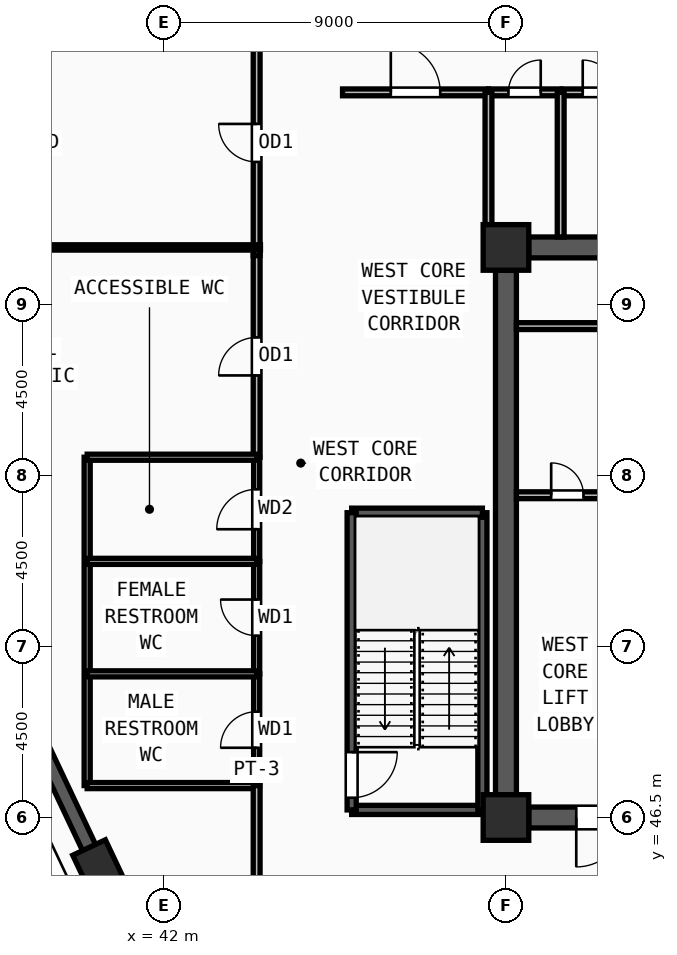
"""IFC4 building model, lengths in metres.
Left out: names, types, materials, properties, quantities, classifications, styles, units other than length and angle.
Written with IfcOpenShell. Run it as: python <this file> out.ifc"""

import sys

from ifc_helpers import new_model, si_unit, direction, frame, frame_2d, origin, origin_2d, place, context, subcontext, project, spatial, rectangle, extrude, source, transform, mapped, element, fill, save


model = new_model("IFC4")
c1 = context("Model", 3, precision=1e-05, world=origin(), true_north=direction((0.0, 1.0)))
c2 = subcontext(c1, "Body", "Model", "MODEL_VIEW")
j1 = project(units=[si_unit("LENGTHUNIT", "METRE"), si_unit("PLANEANGLEUNIT", "RADIAN")], contexts=[c1])
p1 = place(None, origin())
s1 = spatial("IfcSite", under=j1, at=p1, CompositionType="ELEMENT")
p2 = place(p1, origin())
s2 = spatial("IfcBuilding", under=s1, at=p2, CompositionType="ELEMENT")
p3 = place(p2, frame((0.0, 0.0, 328.5)))
s3 = spatial("IfcBuildingStorey", under=s2, at=p3, CompositionType="ELEMENT", Elevation=328.5)
m1 = source(origin(), c2, "Body", "SweptSolid", [
    extrude(rectangle(XDim=1.2, YDim=1.2, at=origin_2d()), origin(), (0.0, 0.0, 1.0), 3.75),
])
for number, where, z_axis, x_axis in (
    (1, (51.0, 46.5, 0.0), (0.0, 0.0, 1.0), (1.0, 0.0, 0.0)),
    (2, (51.0, 61.5, 0.0), (0.0, 0.0, 1.0), (1.0, 0.0, 0.0)),
):
    element("IfcColumn", number, at=place(p3, frame(where, z_axis=z_axis, x_axis=x_axis)), inside=s3, PredefinedType="COLUMN", context=c2, shape_type="MappedRepresentation", body=[
        mapped(m1, transform((0.0, 0.0, 0.0), x_axis=(1.0, 0.0, 0.0), y_axis=(0.0, 1.0, 0.0), z_axis=(0.0, 0.0, 1.0), scale=1.0)),
    ])
m2 = source(origin(), c2, "Body", "SweptSolid", [
    extrude(rectangle(XDim=1.1, YDim=0.95, at=origin_2d()), origin(), (0.0, 0.0, 1.0), 3.75),
])
p4 = place(p3, frame((40.265, 45.213, 0.0), z_axis=(0.0, 0.0, 1.0), x_axis=(-0.427357863387, 0.904082549661, 0.0)))
e3 = element("IfcColumn", 3, at=p4, inside=s3, PredefinedType="COLUMN", context=c2, shape_type="MappedRepresentation", body=[
    mapped(m2, transform((0.0, 0.0, 0.0), x_axis=(1.0, 0.0, 0.0), y_axis=(0.0, 1.0, 0.0), z_axis=(0.0, 0.0, 1.0), scale=1.0)),
])
p5 = place(p3, frame((30.958, 64.905, 0.0), z_axis=(0.0, 0.0, 1.0), x_axis=(0.427288231304, -0.904115461315, 0.0)))
e4 = element("IfcWall", 4, at=p5, inside=s3, PredefinedType="SOLIDWALL", context=c2, shape_type="SweptSolid", body=[
    extrude(rectangle(XDim=21.241, YDim=0.38, at=frame_2d((10.62, 0.0))), origin(), (0.0, 0.0, 1.0), 3.57),
])
m3 = source(origin(), c2, "Body", "SweptSolid", [
    extrude(rectangle(XDim=1.35, YDim=1.85, at=frame_2d((0.675, 0.925))), frame((0.0, 0.2, 0.0), z_axis=(0.0, -1.0, 0.0), x_axis=(1.0, 0.0, 0.0)), (0.0, 0.0, 1.0), 0.4),
])
p6 = place(p5, frame((4.635, 0.0, 0.55)))
e5 = element("IfcOpeningElement", 5, at=p6, cuts=e4, PredefinedType="OPENING", context=c2, shape_type="MappedRepresentation", body=[
    mapped(m3, transform((0.0, 0.0, 0.0), x_axis=(1.0, 0.0, 0.0), y_axis=(0.0, 1.0, 0.0), z_axis=(0.0, 0.0, 1.0), scale=1.0)),
])
p7 = place(p5, frame((9.945, 0.0, 0.55)))
e6 = element("IfcOpeningElement", 6, at=p7, cuts=e4, PredefinedType="OPENING", context=c2, shape_type="MappedRepresentation", body=[
    mapped(m3, transform((0.0, 0.0, 0.0), x_axis=(1.0, 0.0, 0.0), y_axis=(0.0, 1.0, 0.0), z_axis=(0.0, 0.0, 1.0), scale=1.0)),
])
p8 = place(p5, frame((15.256, 0.0, 0.55)))
e7 = element("IfcOpeningElement", 7, at=p8, cuts=e4, PredefinedType="OPENING", context=c2, shape_type="MappedRepresentation", body=[
    mapped(m3, transform((0.0, 0.0, 0.0), x_axis=(1.0, 0.0, 0.0), y_axis=(0.0, 1.0, 0.0), z_axis=(0.0, 0.0, 1.0), scale=1.0)),
])
p9 = place(p3, frame((51.6, 61.5, 0.0), z_axis=(0.0, 0.0, 1.0), x_axis=(1.0, 0.0, 0.0)))
e8 = element("IfcWall", 8, at=p9, inside=s3, PredefinedType="SHEAR", context=c2, shape_type="SweptSolid", body=[
    extrude(rectangle(XDim=7.8, YDim=0.55, at=frame_2d((3.9, 0.0))), origin(), (0.0, 0.0, 1.0), 3.57),
])
p10 = place(p3, frame((59.4, 46.5, 0.0), z_axis=(0.0, 0.0, 1.0), x_axis=(-1.0, 0.0, 0.0)))
e9 = element("IfcWall", 9, at=p10, inside=s3, PredefinedType="SHEAR", context=c2, shape_type="SweptSolid", body=[
    extrude(rectangle(XDim=7.8, YDim=0.55, at=frame_2d((3.9, 0.0))), origin(), (0.0, 0.0, 1.0), 3.57),
])
m4 = source(origin(), c2, "Body", "SweptSolid", [
    extrude(rectangle(XDim=1.3, YDim=2.2, at=frame_2d((0.65, 1.1))), frame((0.0, 0.285, 0.0), z_axis=(0.0, -1.0, 0.0), x_axis=(1.0, 0.0, 0.0)), (0.0, 0.0, 1.0), 0.57),
])
p11 = place(p10, frame((5.25, 0.0, 0.0)))
e10 = element("IfcOpeningElement", 10, at=p11, cuts=e9, PredefinedType="OPENING", context=c2, shape_type="MappedRepresentation", body=[
    mapped(m4, transform((0.0, 0.0, 0.0), x_axis=(1.0, 0.0, 0.0), y_axis=(0.0, 1.0, 0.0), z_axis=(0.0, 0.0, 1.0), scale=1.0)),
])
m5 = source(origin(), c2, "Body", "SweptSolid", [
    extrude(rectangle(XDim=1.0, YDim=2.2, at=frame_2d((0.5, 1.1))), frame((0.0, 0.285, 0.0), z_axis=(0.0, -1.0, 0.0), x_axis=(1.0, 0.0, 0.0)), (0.0, 0.0, 1.0), 0.57),
])
p12 = place(p10, frame((0.75, 0.0, 0.0)))
e11 = element("IfcOpeningElement", 11, at=p12, cuts=e9, PredefinedType="OPENING", context=c2, shape_type="MappedRepresentation", body=[
    mapped(m5, transform((0.0, 0.0, 0.0), x_axis=(1.0, 0.0, 0.0), y_axis=(0.0, 1.0, 0.0), z_axis=(0.0, 0.0, 1.0), scale=1.0)),
])
p13 = place(p3, frame((51.0, 47.1, 0.0), z_axis=(0.0, 0.0, 1.0), x_axis=(0.0, 1.0, 0.0)))
e12 = element("IfcWall", 12, at=p13, inside=s3, PredefinedType="SHEAR", context=c2, shape_type="SweptSolid", body=[
    extrude(rectangle(XDim=13.8, YDim=0.55, at=frame_2d((6.9, 0.0))), origin(), (0.0, 0.0, 1.0), 3.57),
])
p14 = place(p3, frame((46.94, 46.7, 0.0), z_axis=(0.0, 0.0, 1.0), x_axis=(1.0, 0.0, 0.0)))
e13 = element("IfcWall", 13, at=p14, inside=s3, PredefinedType="SOLIDWALL", context=c2, shape_type="SweptSolid", body=[
    extrude(rectangle(XDim=3.44, YDim=0.24, at=frame_2d((1.72, 0.0))), origin(), (0.0, 0.0, 1.0), 3.57),
])
p15 = place(p3, frame((50.38, 46.7, 0.0), z_axis=(0.0, 0.0, 1.0), x_axis=(0.0, 1.0, 0.0)))
e14 = element("IfcWall", 14, at=p15, inside=s3, PredefinedType="SOLIDWALL", context=c2, shape_type="SweptSolid", body=[
    extrude(rectangle(XDim=7.82, YDim=0.24, at=frame_2d((3.91, 0.0))), origin(), (0.0, 0.0, 1.0), 3.57),
])
p16 = place(p3, frame((50.38, 54.52, 0.0), z_axis=(0.0, 0.0, 1.0), x_axis=(-1.0, 0.0, 0.0)))
e15 = element("IfcWall", 15, at=p16, inside=s3, PredefinedType="SOLIDWALL", context=c2, shape_type="SweptSolid", body=[
    extrude(rectangle(XDim=3.44, YDim=0.24, at=frame_2d((1.72, 0.0))), origin(), (0.0, 0.0, 1.0), 3.57),
])
p17 = place(p3, frame((46.94, 54.52, 0.0), z_axis=(0.0, 0.0, 1.0), x_axis=(0.0, -1.0, 0.0)))
e16 = element("IfcWall", 16, at=p17, inside=s3, PredefinedType="SOLIDWALL", context=c2, shape_type="SweptSolid", body=[
    extrude(rectangle(XDim=7.82, YDim=0.24, at=frame_2d((3.91, 0.0))), origin(), (0.0, 0.0, 1.0), 3.57),
])
m6 = source(origin(), c2, "Body", "SweptSolid", [
    extrude(rectangle(XDim=1.2, YDim=2.2, at=frame_2d((0.6, 1.1))), frame((0.0, 0.13, 0.0), z_axis=(0.0, -1.0, 0.0), x_axis=(1.0, 0.0, 0.0)), (0.0, 0.0, 1.0), 0.26),
])
p18 = place(p17, frame((6.3, 0.0, 0.0)))
e17 = element("IfcOpeningElement", 17, at=p18, cuts=e16, PredefinedType="OPENING", context=c2, shape_type="MappedRepresentation", body=[
    mapped(m6, transform((0.0, 0.0, 0.0), x_axis=(1.0, 0.0, 0.0), y_axis=(0.0, 1.0, 0.0), z_axis=(0.0, 0.0, 1.0), scale=1.0)),
])
p19 = place(p3, frame((51.275, 54.98, 0.0), z_axis=(0.0, 0.0, 1.0), x_axis=(1.0, 0.0, 0.0)))
e18 = element("IfcWall", 18, at=p19, inside=s3, PredefinedType="PARTITIONING", context=c2, shape_type="SweptSolid", body=[
    extrude(rectangle(XDim=2.485, YDim=0.18, at=frame_2d((1.243, 0.0))), origin(), (0.0, 0.0, 1.0), 3.57),
])
m7 = source(origin(), c2, "Body", "SweptSolid", [
    extrude(rectangle(XDim=0.85, YDim=2.1, at=frame_2d((0.425, 1.05))), frame((0.0, 0.1, 0.0), z_axis=(0.0, -1.0, 0.0), x_axis=(1.0, 0.0, 0.0)), (0.0, 0.0, 1.0), 0.2),
])
p20 = place(p19, frame((0.915, 0.0, 0.0)))
e19 = element("IfcOpeningElement", 19, at=p20, cuts=e18, PredefinedType="OPENING", context=c2, shape_type="MappedRepresentation", body=[
    mapped(m7, transform((0.0, 0.0, 0.0), x_axis=(1.0, 0.0, 0.0), y_axis=(0.0, 1.0, 0.0), z_axis=(0.0, 0.0, 1.0), scale=1.0)),
])
p21 = place(p3, frame((44.44, 47.34, 0.0), z_axis=(0.0, 0.0, 1.0), x_axis=(0.0, 1.0, 0.0)))
e20 = element("IfcWall", 20, at=p21, inside=s3, PredefinedType="PARTITIONING", context=c2, shape_type="SweptSolid", body=[
    extrude(rectangle(XDim=2.94, YDim=0.16, at=frame_2d((1.47, 0.0))), origin(), (0.0, 0.0, 1.0), 3.57),
])
m8 = source(origin(), c2, "Body", "SweptSolid", [
    extrude(rectangle(XDim=0.95, YDim=2.15, at=frame_2d((0.475, 1.075))), frame((0.0, 0.09, 0.0), z_axis=(0.0, -1.0, 0.0), x_axis=(1.0, 0.0, 0.0)), (0.0, 0.0, 1.0), 0.18),
])
p22 = place(p21, frame((0.995, 0.0, 0.0)))
e21 = element("IfcOpeningElement", 21, at=p22, cuts=e20, PredefinedType="OPENING", context=c2, shape_type="MappedRepresentation", body=[
    mapped(m8, transform((0.0, 0.0, 0.0), x_axis=(1.0, 0.0, 0.0), y_axis=(0.0, 1.0, 0.0), z_axis=(0.0, 0.0, 1.0), scale=1.0)),
])
p23 = place(p3, frame((44.44, 50.28, 0.0), z_axis=(0.0, 0.0, 1.0), x_axis=(0.0, 1.0, 0.0)))
e22 = element("IfcWall", 22, at=p23, inside=s3, PredefinedType="PARTITIONING", context=c2, shape_type="SweptSolid", body=[
    extrude(rectangle(XDim=2.96, YDim=0.16, at=frame_2d((1.48, 0.0))), origin(), (0.0, 0.0, 1.0), 3.57),
])
p24 = place(p23, frame((1.005, 0.0, 0.0)))
e23 = element("IfcOpeningElement", 23, at=p24, cuts=e22, PredefinedType="OPENING", context=c2, shape_type="MappedRepresentation", body=[
    mapped(m8, transform((0.0, 0.0, 0.0), x_axis=(1.0, 0.0, 0.0), y_axis=(0.0, 1.0, 0.0), z_axis=(0.0, 0.0, 1.0), scale=1.0)),
])
p25 = place(p3, frame((44.44, 53.24, 0.0), z_axis=(0.0, 0.0, 1.0), x_axis=(0.0, 1.0, 0.0)))
e24 = element("IfcWall", 24, at=p25, inside=s3, PredefinedType="PARTITIONING", context=c2, shape_type="SweptSolid", body=[
    extrude(rectangle(XDim=2.74, YDim=0.16, at=frame_2d((1.37, 0.0))), origin(), (0.0, 0.0, 1.0), 3.261),
])
m9 = source(origin(), c2, "Body", "SweptSolid", [
    extrude(rectangle(XDim=1.05, YDim=2.15, at=frame_2d((0.525, 1.075))), frame((0.0, 0.09, 0.0), z_axis=(0.0, -1.0, 0.0), x_axis=(1.0, 0.0, 0.0)), (0.0, 0.0, 1.0), 0.18),
])
p26 = place(p25, frame((0.845, 0.0, 0.0)))
e25 = element("IfcOpeningElement", 25, at=p26, cuts=e24, PredefinedType="OPENING", context=c2, shape_type="MappedRepresentation", body=[
    mapped(m9, transform((0.0, 0.0, 0.0), x_axis=(1.0, 0.0, 0.0), y_axis=(0.0, 1.0, 0.0), z_axis=(0.0, 0.0, 1.0), scale=1.0)),
])
p27 = place(p3, frame((50.54, 65.58, 0.0), z_axis=(0.0, 0.0, 1.0), x_axis=(1.0, 0.0, 0.0)))
e26 = element("IfcWall", 26, at=p27, inside=s3, PredefinedType="PARTITIONING", context=c2, shape_type="SweptSolid", body=[
    extrude(rectangle(XDim=1.9, YDim=0.18, at=frame_2d((0.95, 0.0))), origin(), (0.0, 0.0, 1.0), 3.57),
])
p28 = place(p27, frame((0.525, 0.0, 0.0)))
e27 = element("IfcOpeningElement", 27, at=p28, cuts=e26, PredefinedType="OPENING", context=c2, shape_type="MappedRepresentation", body=[
    mapped(m7, transform((0.0, 0.0, 0.0), x_axis=(1.0, 0.0, 0.0), y_axis=(0.0, 1.0, 0.0), z_axis=(0.0, 0.0, 1.0), scale=1.0)),
])
p29 = place(p3, frame((52.48, 65.58, 0.0), z_axis=(0.0, 0.0, 1.0), x_axis=(1.0, 0.0, 0.0)))
e28 = element("IfcWall", 28, at=p29, inside=s3, PredefinedType="PARTITIONING", context=c2, shape_type="SweptSolid", body=[
    extrude(rectangle(XDim=1.93, YDim=0.18, at=frame_2d((0.965, 0.0))), origin(), (0.0, 0.0, 1.0), 3.57),
])
p30 = place(p29, frame((0.54, 0.0, 0.0)))
e29 = element("IfcOpeningElement", 29, at=p30, cuts=e28, PredefinedType="OPENING", context=c2, shape_type="MappedRepresentation", body=[
    mapped(m7, transform((0.0, 0.0, 0.0), x_axis=(1.0, 0.0, 0.0), y_axis=(0.0, 1.0, 0.0), z_axis=(0.0, 0.0, 1.0), scale=1.0)),
])
p31 = place(p3, frame((46.7, 65.58, 0.0), z_axis=(0.0, 0.0, 1.0), x_axis=(1.0, 0.0, 0.0)))
e30 = element("IfcWall", 30, at=p31, inside=s3, PredefinedType="PARTITIONING", context=c2, shape_type="SweptSolid", body=[
    extrude(rectangle(XDim=3.84, YDim=0.18, at=frame_2d((1.92, 0.0))), origin(), (0.0, 0.0, 1.0), 3.57),
])
m10 = source(origin(), c2, "Body", "SweptSolid", [
    extrude(rectangle(XDim=1.3, YDim=2.2, at=frame_2d((0.65, 1.1))), frame((0.0, 0.1, 0.0), z_axis=(0.0, -1.0, 0.0), x_axis=(1.0, 0.0, 0.0)), (0.0, 0.0, 1.0), 0.2),
])
p32 = place(p31, frame((1.27, 0.0, 0.0)))
e31 = element("IfcOpeningElement", 31, at=p32, cuts=e30, PredefinedType="OPENING", context=c2, shape_type="MappedRepresentation", body=[
    mapped(m10, transform((0.0, 0.0, 0.0), x_axis=(1.0, 0.0, 0.0), y_axis=(0.0, 1.0, 0.0), z_axis=(0.0, 0.0, 1.0), scale=1.0)),
])
p33 = place(p3, frame((44.44, 61.285, 0.0), z_axis=(0.0, 0.0, 1.0), x_axis=(0.0, 1.0, 0.0)))
e32 = element("IfcWall", 32, at=p33, inside=s3, PredefinedType="PARTITIONING", context=c2, shape_type="SweptSolid", body=[
    extrude(rectangle(XDim=5.93, YDim=0.18, at=frame_2d((2.965, 0.0))), origin(), (0.0, 0.0, 1.0), 3.57),
])
m11 = source(origin(), c2, "Body", "SweptSolid", [
    extrude(rectangle(XDim=1.0, YDim=2.2, at=frame_2d((0.5, 1.1))), frame((0.0, 0.1, 0.0), z_axis=(0.0, -1.0, 0.0), x_axis=(1.0, 0.0, 0.0)), (0.0, 0.0, 1.0), 0.2),
])
p34 = place(p33, frame((2.465, 0.0, 0.0)))
e33 = element("IfcOpeningElement", 33, at=p34, cuts=e32, PredefinedType="OPENING", context=c2, shape_type="MappedRepresentation", body=[
    mapped(m11, transform((0.0, 0.0, 0.0), x_axis=(1.0, 0.0, 0.0), y_axis=(0.0, 1.0, 0.0), z_axis=(0.0, 0.0, 1.0), scale=1.0)),
])
p35 = place(p3, frame((44.44, 55.98, 0.0), z_axis=(0.0, 0.0, 1.0), x_axis=(0.0, 1.0, 0.0)))
e34 = element("IfcWall", 34, at=p35, inside=s3, PredefinedType="PARTITIONING", context=c2, shape_type="SweptSolid", body=[
    extrude(rectangle(XDim=5.305, YDim=0.18, at=frame_2d((2.652, 0.0))), origin(), (0.0, 0.0, 1.0), 3.57),
])
p36 = place(p35, frame((2.152, 0.0, 0.0)))
e35 = element("IfcOpeningElement", 35, at=p36, cuts=e34, PredefinedType="OPENING", context=c2, shape_type="MappedRepresentation", body=[
    mapped(m11, transform((0.0, 0.0, 0.0), x_axis=(1.0, 0.0, 0.0), y_axis=(0.0, 1.0, 0.0), z_axis=(0.0, 0.0, 1.0), scale=1.0)),
])
p37 = place(p3, frame((51.275, 59.43, 0.0), z_axis=(0.0, 0.0, 1.0), x_axis=(1.0, 0.0, 0.0)))
e36 = element("IfcWall", 36, at=p37, inside=s3, PredefinedType="PARTITIONING", context=c2, shape_type="SweptSolid", body=[
    extrude(rectangle(XDim=2.505, YDim=0.18, at=frame_2d((1.252, 0.0))), origin(), (0.0, 0.0, 1.0), 3.57),
])
p38 = place(p3, frame((39.98, 47.34, 0.0), z_axis=(0.0, 0.0, 1.0), x_axis=(0.0, 1.0, 0.0)))
e37 = element("IfcWall", 37, at=p38, inside=s3, PredefinedType="PARTITIONING", context=c2, shape_type="SweptSolid", body=[
    extrude(rectangle(XDim=8.64, YDim=0.16, at=frame_2d((4.32, 0.0))), origin(), (0.0, 0.0, 1.0), 3.57),
])
for number, where, z_axis, x_axis in (
    (38, (39.98, 47.34, 0.0), (0.0, 0.0, 1.0), (1.0, 0.0, 0.0)),
    (39, (39.98, 50.28, 0.0), (0.0, 0.0, 1.0), (1.0, 0.0, 0.0)),
    (40, (39.98, 53.24, 0.0), (0.0, 0.0, 1.0), (1.0, 0.0, 0.0)),
    (41, (39.98, 55.98, 0.0), (0.0, 0.0, 1.0), (1.0, 0.0, 0.0)),
):
    element("IfcWall", number, at=place(p3, frame(where, z_axis=z_axis, x_axis=x_axis)), inside=s3, PredefinedType="PARTITIONING", context=c2, shape_type="SweptSolid", body=[
        extrude(rectangle(XDim=4.46, YDim=0.16, at=frame_2d((2.23, 0.0))), origin(), (0.0, 0.0, 1.0), 3.57),
    ])
p39 = place(p3, frame((50.54, 61.95, 0.0), z_axis=(0.0, 0.0, 1.0), x_axis=(0.0, 1.0, 0.0)))
e42 = element("IfcWall", 42, at=p39, inside=s3, PredefinedType="PARTITIONING", context=c2, shape_type="SweptSolid", body=[
    extrude(rectangle(XDim=3.63, YDim=0.18, at=frame_2d((1.815, 0.0))), origin(), (0.0, 0.0, 1.0), 3.57),
])
p40 = place(p3, frame((52.44, 61.775, 0.0), z_axis=(0.0, 0.0, 1.0), x_axis=(0.0, 1.0, 0.0)))
e43 = element("IfcWall", 43, at=p40, inside=s3, PredefinedType="PARTITIONING", context=c2, shape_type="SweptSolid", body=[
    extrude(rectangle(XDim=3.805, YDim=0.18, at=frame_2d((1.903, 0.0))), origin(), (0.0, 0.0, 1.0), 3.57),
])
p41 = place(p3, frame((44.44, 44.385, 0.0), z_axis=(0.0, 0.0, 1.0), x_axis=(0.0, 1.0, 0.0)))
e44 = element("IfcWall", 44, at=p41, inside=s3, PredefinedType="PARTITIONING", context=c2, shape_type="SweptSolid", body=[
    extrude(rectangle(XDim=2.955, YDim=0.18, at=frame_2d((1.478, 0.0))), origin(), (0.0, 0.0, 1.0), 3.57),
])
p42 = place(p3, frame((44.54, 61.5, 0.0), z_axis=(0.0, 0.0, 1.0), x_axis=(-1.0, 0.0, 0.0)))
e45 = element("IfcWall", 45, at=p42, inside=s3, PredefinedType="PARTITIONING", context=c2, shape_type="SweptSolid", body=[
    extrude(rectangle(XDim=12.67, YDim=0.14, at=frame_2d((6.335, 0.0))), origin(), (0.0, 0.0, 1.0), 3.57),
])
m12 = source(origin(), c2, "Body", "SweptSolid", [
    extrude(rectangle(XDim=1.3, YDim=2.2, at=frame_2d((0.65, 1.1))), frame((0.0, 0.025, 0.0), z_axis=(0.0, -1.0, 0.0), x_axis=(1.0, 0.0, 0.0)), (0.0, 0.0, 1.0), 0.05),
])
p43 = place(p11, origin())
e46 = element("IfcDoor", 46, at=p43, inside=s3, OperationType="SINGLE_SWING_RIGHT", PredefinedType="DOOR", context=c2, shape_type="MappedRepresentation", body=[
    mapped(m12, transform((0.0, 0.0, 0.0), x_axis=(1.0, 0.0, 0.0), y_axis=(0.0, 1.0, 0.0), z_axis=(0.0, 0.0, 1.0), scale=1.0)),
])
fill(e10, e46)
m13 = source(origin(), c2, "Body", "SweptSolid", [
    extrude(rectangle(XDim=1.2, YDim=2.2, at=frame_2d((0.6, 1.1))), frame((0.0, 0.025, 0.0), z_axis=(0.0, -1.0, 0.0), x_axis=(1.0, 0.0, 0.0)), (0.0, 0.0, 1.0), 0.05),
])
p44 = place(p18, origin())
e47 = element("IfcDoor", 47, at=p44, inside=s3, OperationType="SINGLE_SWING_LEFT", PredefinedType="DOOR", context=c2, shape_type="MappedRepresentation", body=[
    mapped(m13, transform((0.0, 0.0, 0.0), x_axis=(1.0, 0.0, 0.0), y_axis=(0.0, 1.0, 0.0), z_axis=(0.0, 0.0, 1.0), scale=1.0)),
])
fill(e17, e47)
m14 = source(origin(), c2, "Body", "SweptSolid", [
    extrude(rectangle(XDim=0.85, YDim=2.1, at=frame_2d((0.425, 1.05))), frame((0.0, 0.025, 0.0), z_axis=(0.0, -1.0, 0.0), x_axis=(1.0, 0.0, 0.0)), (0.0, 0.0, 1.0), 0.05),
])
p45 = place(p20, origin())
e48 = element("IfcDoor", 48, at=p45, inside=s3, OperationType="SINGLE_SWING_LEFT", PredefinedType="DOOR", context=c2, shape_type="MappedRepresentation", body=[
    mapped(m14, transform((0.0, 0.0, 0.0), x_axis=(1.0, 0.0, 0.0), y_axis=(0.0, 1.0, 0.0), z_axis=(0.0, 0.0, 1.0), scale=1.0)),
])
fill(e19, e48)
m15 = source(origin(), c2, "Body", "SweptSolid", [
    extrude(rectangle(XDim=0.95, YDim=2.15, at=frame_2d((0.475, 1.075))), frame((0.0, 0.025, 0.0), z_axis=(0.0, -1.0, 0.0), x_axis=(1.0, 0.0, 0.0)), (0.0, 0.0, 1.0), 0.05),
])
p46 = place(p22, origin())
e49 = element("IfcDoor", 49, at=p46, inside=s3, OperationType="SINGLE_SWING_LEFT", PredefinedType="DOOR", context=c2, shape_type="MappedRepresentation", body=[
    mapped(m15, transform((0.0, 0.0, 0.0), x_axis=(1.0, 0.0, 0.0), y_axis=(0.0, 1.0, 0.0), z_axis=(0.0, 0.0, 1.0), scale=1.0)),
])
fill(e21, e49)
p47 = place(p24, origin())
e50 = element("IfcDoor", 50, at=p47, inside=s3, OperationType="SINGLE_SWING_RIGHT", PredefinedType="DOOR", context=c2, shape_type="MappedRepresentation", body=[
    mapped(m15, transform((0.0, 0.0, 0.0), x_axis=(1.0, 0.0, 0.0), y_axis=(0.0, 1.0, 0.0), z_axis=(0.0, 0.0, 1.0), scale=1.0)),
])
fill(e23, e50)
m16 = source(origin(), c2, "Body", "SweptSolid", [
    extrude(rectangle(XDim=1.05, YDim=2.15, at=frame_2d((0.525, 1.075))), frame((0.0, 0.025, 0.0), z_axis=(0.0, -1.0, 0.0), x_axis=(1.0, 0.0, 0.0)), (0.0, 0.0, 1.0), 0.05),
])
p48 = place(p26, origin())
e51 = element("IfcDoor", 51, at=p48, inside=s3, OperationType="SINGLE_SWING_LEFT", PredefinedType="DOOR", context=c2, shape_type="MappedRepresentation", body=[
    mapped(m16, transform((0.0, 0.0, 0.0), x_axis=(1.0, 0.0, 0.0), y_axis=(0.0, 1.0, 0.0), z_axis=(0.0, 0.0, 1.0), scale=1.0)),
])
fill(e25, e51)
p49 = place(p28, origin())
e52 = element("IfcDoor", 52, at=p49, inside=s3, OperationType="SINGLE_SWING_RIGHT", PredefinedType="DOOR", context=c2, shape_type="MappedRepresentation", body=[
    mapped(m14, transform((0.0, 0.0, 0.0), x_axis=(1.0, 0.0, 0.0), y_axis=(0.0, 1.0, 0.0), z_axis=(0.0, 0.0, 1.0), scale=1.0)),
])
fill(e27, e52)
p50 = place(p30, origin())
e53 = element("IfcDoor", 53, at=p50, inside=s3, OperationType="SINGLE_SWING_LEFT", PredefinedType="DOOR", context=c2, shape_type="MappedRepresentation", body=[
    mapped(m14, transform((0.0, 0.0, 0.0), x_axis=(1.0, 0.0, 0.0), y_axis=(0.0, 1.0, 0.0), z_axis=(0.0, 0.0, 1.0), scale=1.0)),
])
fill(e29, e53)
p51 = place(p32, origin())
e54 = element("IfcDoor", 54, at=p51, inside=s3, OperationType="SINGLE_SWING_LEFT", PredefinedType="DOOR", context=c2, shape_type="MappedRepresentation", body=[
    mapped(m12, transform((0.0, 0.0, 0.0), x_axis=(1.0, 0.0, 0.0), y_axis=(0.0, 1.0, 0.0), z_axis=(0.0, 0.0, 1.0), scale=1.0)),
])
fill(e31, e54)
m17 = source(origin(), c2, "Body", "SweptSolid", [
    extrude(rectangle(XDim=1.0, YDim=2.2, at=frame_2d((0.5, 1.1))), frame((0.0, 0.025, 0.0), z_axis=(0.0, -1.0, 0.0), x_axis=(1.0, 0.0, 0.0)), (0.0, 0.0, 1.0), 0.05),
])
p52 = place(p34, origin())
e55 = element("IfcDoor", 55, at=p52, inside=s3, OperationType="SINGLE_SWING_RIGHT", PredefinedType="DOOR", context=c2, shape_type="MappedRepresentation", body=[
    mapped(m17, transform((0.0, 0.0, 0.0), x_axis=(1.0, 0.0, 0.0), y_axis=(0.0, 1.0, 0.0), z_axis=(0.0, 0.0, 1.0), scale=1.0)),
])
fill(e33, e55)
p53 = place(p36, origin())
e56 = element("IfcDoor", 56, at=p53, inside=s3, OperationType="SINGLE_SWING_LEFT", PredefinedType="DOOR", context=c2, shape_type="MappedRepresentation", body=[
    mapped(m17, transform((0.0, 0.0, 0.0), x_axis=(1.0, 0.0, 0.0), y_axis=(0.0, 1.0, 0.0), z_axis=(0.0, 0.0, 1.0), scale=1.0)),
])
fill(e35, e56)
save(model, sys.argv[1])
